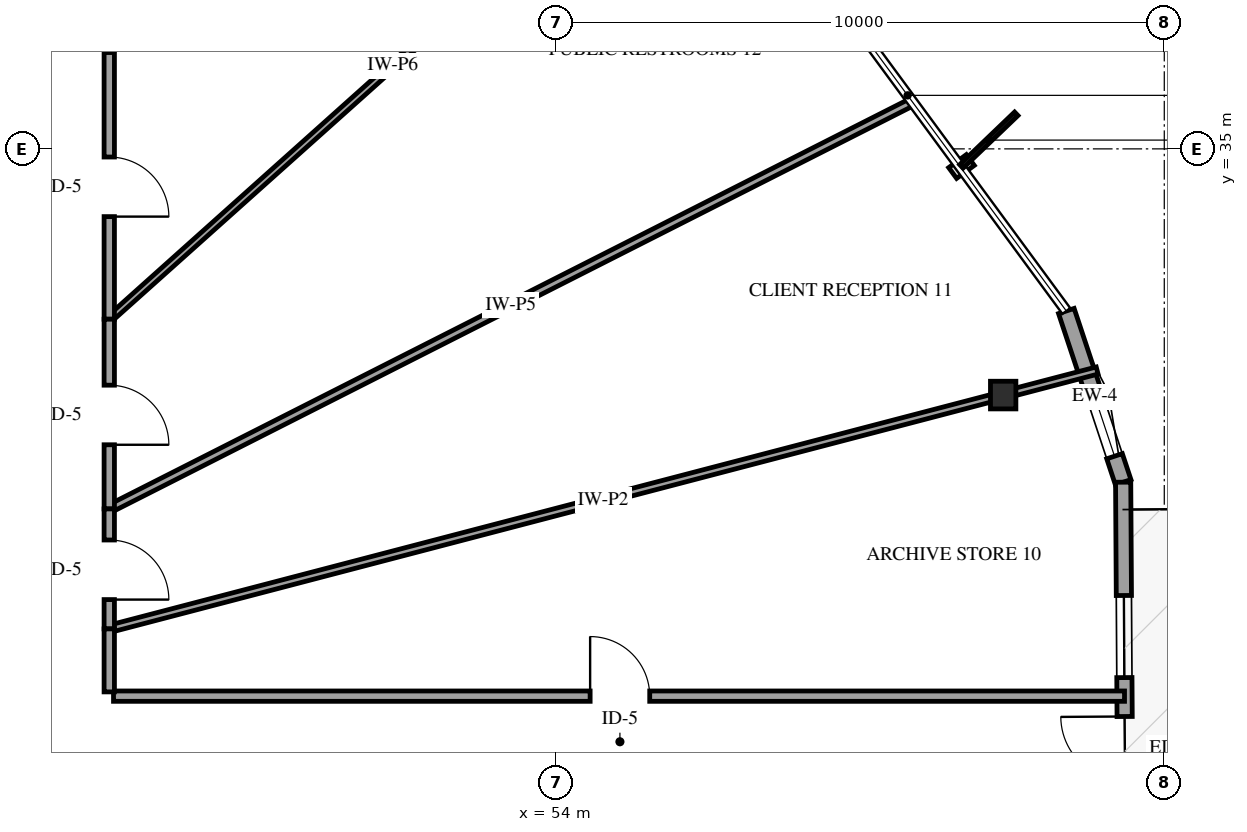
"""IFC4 building model, lengths in metres.
Left out: names, types, materials, properties, quantities, classifications, styles, units other than length and angle.
Written with IfcOpenShell. Run it as: python <this file> out.ifc"""

import sys

from ifc_helpers import new_model, si_unit, direction, frame, frame_2d, origin, origin_2d, place, context, subcontext, project, spatial, rectangle, i_section, extrude, element, fill, save


model = new_model("IFC4")
c1 = context("Model", 3, precision=1e-05, world=origin(), true_north=direction((0.0, 1.0)))
c2 = subcontext(c1, "Body", "Model", "MODEL_VIEW")
j1 = project(units=[si_unit("LENGTHUNIT", "METRE"), si_unit("PLANEANGLEUNIT", "RADIAN")], contexts=[c1])
p1 = place(None, origin())
s1 = spatial("IfcSite", under=j1, at=p1, CompositionType="ELEMENT")
p2 = place(p1, origin())
s2 = spatial("IfcBuilding", under=s1, at=p2, CompositionType="ELEMENT")
p3 = place(p2, frame((0.0, 0.0, 99.1)))
s3 = spatial("IfcBuildingStorey", under=s2, at=p3, CompositionType="ELEMENT", Elevation=99.1)
p4 = place(p3, frame((61.351, 30.951, 0.0), z_axis=(0.0, 0.0, 1.0), x_axis=(1.0, 0.0, 0.0)))
e1 = element("IfcColumn", 1, at=p4, inside=s3, PredefinedType="COLUMN", context=c2, shape_type="SweptSolid", body=[
    extrude(i_section(OverallWidth=0.418, OverallDepth=0.455, WebThickness=0.042, FlangeThickness=0.068, FilletRadius=0.038, at=origin_2d()), origin(), (0.0, 0.0, 1.0), 3.9),
])
p5 = place(p3, frame((63.324, 29.519, 0.0), z_axis=(0.0, 0.0, 1.0), x_axis=(-0.314968272773, 0.94910220058, 0.0)))
e2 = element("IfcWall", 2, at=p5, inside=s3, PredefinedType="SOLIDWALL", context=c2, shape_type="SweptSolid", body=[
    extrude(rectangle(XDim=2.966, YDim=0.27, at=frame_2d((1.483, 0.0))), origin(), (0.0, 0.0, 1.0), 2.979),
])
p6 = place(p5, frame((0.45, 0.0, 0.75)))
e3 = element("IfcOpeningElement", 3, at=p6, cuts=e2, PredefinedType="OPENING", context=c2, shape_type="SweptSolid", body=[
    extrude(rectangle(XDim=0.9, YDim=1.5, at=frame_2d((0.45, 0.75))), frame((0.0, 0.145, 0.0), z_axis=(0.0, -1.0, 0.0), x_axis=(1.0, 0.0, 0.0)), (0.0, 0.0, 1.0), 0.29),
])
p7 = place(p3, frame((63.379, 20.712, 0.0), z_axis=(0.0, 0.0, 1.0), x_axis=(-0.006293019465, 0.999980198757, 0.0)))
e4 = element("IfcWall", 4, at=p7, inside=s3, PredefinedType="SOLIDWALL", context=c2, shape_type="SweptSolid", body=[
    extrude(rectangle(XDim=8.807, YDim=0.25, at=frame_2d((4.403, 0.0))), origin(), (0.0, 0.0, 1.0), 2.979),
])
p8 = place(p7, frame((3.903, 0.0, 0.0)))
e5 = element("IfcOpeningElement", 5, at=p8, cuts=e4, PredefinedType="OPENING", context=c2, shape_type="SweptSolid", body=[
    extrude(rectangle(XDim=1.05, YDim=2.15, at=frame_2d((0.525, 1.075))), frame((0.0, 0.135, 0.0), z_axis=(0.0, -1.0, 0.0), x_axis=(1.0, 0.0, 0.0)), (0.0, 0.0, 1.0), 0.27),
])
p9 = place(p7, frame((0.44, 0.0, 0.72)))
e6 = element("IfcOpeningElement", 6, at=p9, cuts=e4, PredefinedType="OPENING", context=c2, shape_type="SweptSolid", body=[
    extrude(rectangle(XDim=1.35, YDim=1.65, at=frame_2d((0.675, 0.825))), frame((0.0, 0.135, 0.0), z_axis=(0.0, -1.0, 0.0), x_axis=(1.0, 0.0, 0.0)), (0.0, 0.0, 1.0), 0.27),
])
p10 = place(p7, frame((5.593, 0.0, 0.72)))
e7 = element("IfcOpeningElement", 7, at=p10, cuts=e4, PredefinedType="OPENING", context=c2, shape_type="SweptSolid", body=[
    extrude(rectangle(XDim=1.35, YDim=1.65, at=frame_2d((0.675, 0.825))), frame((0.0, 0.135, 0.0), z_axis=(0.0, -1.0, 0.0), x_axis=(1.0, 0.0, 0.0)), (0.0, 0.0, 1.0), 0.27),
])
p11 = place(p3, frame((46.65, 27.106, 0.0), z_axis=(0.0, 0.0, 1.0), x_axis=(0.967458365638, 0.253030256606, 0.0)))
e8 = element("IfcWall", 8, at=p11, inside=s3, PredefinedType="PARTITIONING", context=c2, shape_type="SweptSolid", body=[
    extrude(rectangle(XDim=16.792, YDim=0.12, at=frame_2d((8.396, 0.0))), origin(), (0.0, 0.0, 1.0), 2.895),
])
p12 = place(p3, frame((46.72, 26.0, 0.0), z_axis=(0.0, 0.0, 1.0), x_axis=(1.0, 0.0, 0.0)))
e9 = element("IfcWall", 9, at=p12, inside=s3, PredefinedType="PARTITIONING", context=c2, shape_type="SweptSolid", body=[
    extrude(rectangle(XDim=16.626, YDim=0.17, at=frame_2d((8.313, 0.0))), origin(), (0.0, 0.0, 1.0), 3.6),
])
p13 = place(p12, frame((7.838, 0.0, 0.0)))
e10 = element("IfcOpeningElement", 10, at=p13, cuts=e9, PredefinedType="OPENING", context=c2, shape_type="SweptSolid", body=[
    extrude(rectangle(XDim=0.98, YDim=2.15, at=frame_2d((0.49, 1.075))), frame((0.0, 0.095, 0.0), z_axis=(0.0, -1.0, 0.0), x_axis=(1.0, 0.0, 0.0)), (0.0, 0.0, 1.0), 0.19),
])
p14 = place(p3, frame((46.65, 29.079, 0.0), z_axis=(0.0, 0.0, 1.0), x_axis=(0.891987023653, 0.452061002117, 0.0)))
e11 = element("IfcWall", 11, at=p14, inside=s3, PredefinedType="PARTITIONING", context=c2, shape_type="SweptSolid", body=[
    extrude(rectangle(XDim=14.807, YDim=0.13, at=frame_2d((7.404, 0.0))), origin(), (0.0, 0.0, 1.0), 3.6),
])
p15 = place(p3, frame((46.65, 32.199, 0.0), z_axis=(0.0, 0.0, 1.0), x_axis=(0.745403019973, 0.666614084621, 0.0)))
e12 = element("IfcWall", 12, at=p15, inside=s3, PredefinedType="PARTITIONING", context=c2, shape_type="SweptSolid", body=[
    extrude(rectangle(XDim=12.516, YDim=0.11, at=frame_2d((6.258, 0.0))), origin(), (0.0, 0.0, 1.0), 2.978),
])
p16 = place(p3, frame((46.65, 36.584, 0.0), z_axis=(0.0, 0.0, 1.0), x_axis=(0.570692229292, 0.821164039292, 0.0)))
e13 = element("IfcWall", 13, at=p16, inside=s3, PredefinedType="PARTITIONING", context=c2, shape_type="SweptSolid", body=[
    extrude(rectangle(XDim=7.13, YDim=0.11, at=frame_2d((3.565, 0.0))), origin(), (0.0, 0.0, 1.0), 2.974),
])
p17 = place(p3, frame((46.65, 36.584, 0.0), z_axis=(0.0, 0.0, 1.0), x_axis=(0.0, -1.0, 0.0)))
e14 = element("IfcWall", 14, at=p17, inside=s3, PredefinedType="PARTITIONING", context=c2, shape_type="SweptSolid", body=[
    extrude(rectangle(XDim=4.385, YDim=0.17, at=frame_2d((2.192, 0.0))), origin(), (0.0, 0.0, 1.0), 3.6),
])
p18 = place(p17, frame((1.718, 0.0, 0.0)))
e15 = element("IfcOpeningElement", 15, at=p18, cuts=e14, PredefinedType="OPENING", context=c2, shape_type="SweptSolid", body=[
    extrude(rectangle(XDim=0.98, YDim=2.15, at=frame_2d((0.49, 1.075))), frame((0.0, 0.095, 0.0), z_axis=(0.0, -1.0, 0.0), x_axis=(1.0, 0.0, 0.0)), (0.0, 0.0, 1.0), 0.19),
])
p19 = place(p3, frame((46.65, 32.199, 0.0), z_axis=(0.0, 0.0, 1.0), x_axis=(0.0, -1.0, 0.0)))
e16 = element("IfcWall", 16, at=p19, inside=s3, PredefinedType="PARTITIONING", context=c2, shape_type="SweptSolid", body=[
    extrude(rectangle(XDim=3.12, YDim=0.17, at=frame_2d((1.56, 0.0))), origin(), (0.0, 0.0, 1.0), 3.6),
])
p20 = place(p19, frame((1.085, 0.0, 0.0)))
e17 = element("IfcOpeningElement", 17, at=p20, cuts=e16, PredefinedType="OPENING", context=c2, shape_type="SweptSolid", body=[
    extrude(rectangle(XDim=0.98, YDim=2.15, at=frame_2d((0.49, 1.075))), frame((0.0, 0.095, 0.0), z_axis=(0.0, -1.0, 0.0), x_axis=(1.0, 0.0, 0.0)), (0.0, 0.0, 1.0), 0.19),
])
p21 = place(p3, frame((46.65, 29.079, 0.0), z_axis=(0.0, 0.0, 1.0), x_axis=(0.0, -1.0, 0.0)))
e18 = element("IfcWall", 18, at=p21, inside=s3, PredefinedType="PARTITIONING", context=c2, shape_type="SweptSolid", body=[
    extrude(rectangle(XDim=1.973, YDim=0.17, at=frame_2d((0.987, 0.0))), origin(), (0.0, 0.0, 1.0), 3.6),
])
p22 = place(p21, frame((0.511, 0.0, 0.0)))
e19 = element("IfcOpeningElement", 19, at=p22, cuts=e18, PredefinedType="OPENING", context=c2, shape_type="SweptSolid", body=[
    extrude(rectangle(XDim=0.98, YDim=2.15, at=frame_2d((0.49, 1.075))), frame((0.0, 0.095, 0.0), z_axis=(0.0, -1.0, 0.0), x_axis=(1.0, 0.0, 0.0)), (0.0, 0.0, 1.0), 0.19),
])
p23 = place(p3, frame((46.65, 27.106, 0.0), z_axis=(0.0, 0.0, 1.0), x_axis=(0.0, -1.0, 0.0)))
e20 = element("IfcWall", 20, at=p23, inside=s3, PredefinedType="PARTITIONING", context=c2, shape_type="SweptSolid", body=[
    extrude(rectangle(XDim=1.036, YDim=0.17, at=frame_2d((0.518, 0.0))), origin(), (0.0, 0.0, 1.0), 3.6),
])
p24 = place(p6, origin())
e21 = element("IfcWindow", 21, at=p24, inside=s3, PartitioningType="SINGLE_PANEL", PredefinedType="WINDOW", context=c2, shape_type="SweptSolid", body=[
    extrude(rectangle(XDim=0.9, YDim=1.5, at=frame_2d((0.45, 0.75))), frame((0.0, 0.03, 0.0), z_axis=(0.0, -1.0, 0.0), x_axis=(1.0, 0.0, 0.0)), (0.0, 0.0, 1.0), 0.06),
])
fill(e3, e21)
p25 = place(p8, origin())
e22 = element("IfcDoor", 22, at=p25, inside=s3, OperationType="SINGLE_SWING_RIGHT", PredefinedType="DOOR", context=c2, shape_type="SweptSolid", body=[
    extrude(rectangle(XDim=1.05, YDim=2.15, at=frame_2d((0.525, 1.075))), frame((0.0, 0.025, 0.0), z_axis=(0.0, -1.0, 0.0), x_axis=(1.0, 0.0, 0.0)), (0.0, 0.0, 1.0), 0.05),
])
fill(e5, e22)
p26 = place(p10, origin())
e23 = element("IfcWindow", 23, at=p26, inside=s3, PartitioningType="SINGLE_PANEL", PredefinedType="WINDOW", context=c2, shape_type="SweptSolid", body=[
    extrude(rectangle(XDim=1.35, YDim=1.65, at=frame_2d((0.675, 0.825))), frame((0.0, 0.03, 0.0), z_axis=(0.0, -1.0, 0.0), x_axis=(1.0, 0.0, 0.0)), (0.0, 0.0, 1.0), 0.06),
])
fill(e7, e23)
p27 = place(p13, origin())
e24 = element("IfcDoor", 24, at=p27, inside=s3, OperationType="SINGLE_SWING_LEFT", PredefinedType="DOOR", context=c2, shape_type="SweptSolid", body=[
    extrude(rectangle(XDim=0.98, YDim=2.15, at=frame_2d((0.49, 1.075))), frame((0.0, 0.025, 0.0), z_axis=(0.0, -1.0, 0.0), x_axis=(1.0, 0.0, 0.0)), (0.0, 0.0, 1.0), 0.05),
])
fill(e10, e24)
p28 = place(p18, origin())
e25 = element("IfcDoor", 25, at=p28, inside=s3, OperationType="SINGLE_SWING_RIGHT", PredefinedType="DOOR", context=c2, shape_type="SweptSolid", body=[
    extrude(rectangle(XDim=0.98, YDim=2.15, at=frame_2d((0.49, 1.075))), frame((0.0, 0.025, 0.0), z_axis=(0.0, -1.0, 0.0), x_axis=(1.0, 0.0, 0.0)), (0.0, 0.0, 1.0), 0.05),
])
fill(e15, e25)
p29 = place(p20, origin())
e26 = element("IfcDoor", 26, at=p29, inside=s3, OperationType="SINGLE_SWING_RIGHT", PredefinedType="DOOR", context=c2, shape_type="SweptSolid", body=[
    extrude(rectangle(XDim=0.98, YDim=2.15, at=frame_2d((0.49, 1.075))), frame((0.0, 0.025, 0.0), z_axis=(0.0, -1.0, 0.0), x_axis=(1.0, 0.0, 0.0)), (0.0, 0.0, 1.0), 0.05),
])
fill(e17, e26)
p30 = place(p22, origin())
e27 = element("IfcDoor", 27, at=p30, inside=s3, OperationType="SINGLE_SWING_RIGHT", PredefinedType="DOOR", context=c2, shape_type="SweptSolid", body=[
    extrude(rectangle(XDim=0.98, YDim=2.15, at=frame_2d((0.49, 1.075))), frame((0.0, 0.025, 0.0), z_axis=(0.0, -1.0, 0.0), x_axis=(1.0, 0.0, 0.0)), (0.0, 0.0, 1.0), 0.05),
])
fill(e19, e27)
save(model, sys.argv[1])
